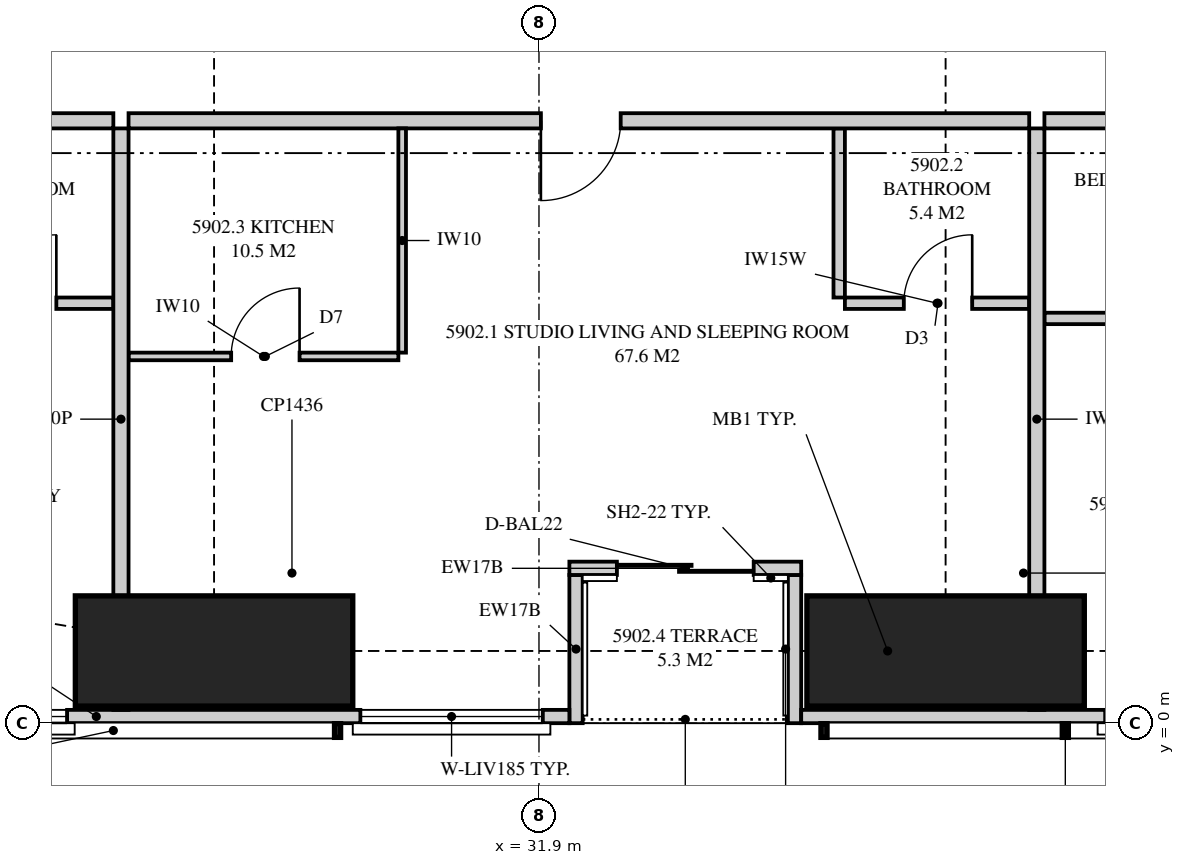
"""IFC4 building model, lengths in metres.
Left out: names, types, materials, properties, quantities, classifications, styles, units other than length and angle.
Written with IfcOpenShell. Run it as: python <this file> out.ifc"""

import sys

from ifc_helpers import new_model, si_unit, direction, frame, frame_2d, origin, origin_2d, place, context, subcontext, project, spatial, polyline, rectangle, outline, extrude, element, fill, save


model = new_model("IFC4")
c1 = context("Model", 3, precision=1e-05, world=origin(), true_north=direction((0.0, 1.0)))
c2 = subcontext(c1, "Body", "Model", "MODEL_VIEW")
j1 = project(units=[si_unit("LENGTHUNIT", "METRE"), si_unit("PLANEANGLEUNIT", "RADIAN")], contexts=[c1])
p1 = place(None, origin())
s1 = spatial("IfcSite", under=j1, at=p1, CompositionType="ELEMENT")
p2 = place(p1, origin())
s2 = spatial("IfcBuilding", under=s1, at=p2, CompositionType="ELEMENT")
p3 = place(p2, frame((0.0, 0.0, 217.95)))
s3 = spatial("IfcBuildingStorey", under=s2, at=p3, CompositionType="ELEMENT", Elevation=217.95)
for number, where, z_axis, x_axis in (
    (1, (27.625, 0.95, 0.0), (0.0, 0.0, 1.0), (0.0, 1.0, 0.0)),
    (2, (37.25, 0.95, 0.0), (0.0, 0.0, 1.0), (0.0, 1.0, 0.0)),
):
    element("IfcColumn", number, at=place(p3, frame(where, z_axis=z_axis, x_axis=x_axis)), inside=s3, PredefinedType="COLUMN", context=c2, shape_type="SweptSolid", body=[
        extrude(rectangle(XDim=1.45, YDim=3.65, at=origin_2d()), origin(), (0.0, 0.0, 1.0), 3.5),
    ])
p4 = place(p3, frame((19.851, 0.087, 0.0), z_axis=(0.0, 0.0, 1.0), x_axis=(1.0, 0.0, 0.0)))
e3 = element("IfcWall", 3, at=p4, inside=s3, PredefinedType="SOLIDWALL", context=c2, shape_type="SweptSolid", body=[
    extrude(outline(polyline([(0.0, 0.0), (12.449, 0.0), (12.449, 2.3), (7.774, 2.3), (7.774, 3.26), (7.642, 3.26), (7.642, 2.3), (7.559, 2.3), (7.559, 3.26), (0.0, 3.26), (0.0, 0.0)])), frame((0.0, 0.087, 0.0), z_axis=(0.0, -1.0, 0.0), x_axis=(1.0, 0.0, 0.0)), (0.0, 0.0, 1.0), 0.175),
])
p5 = place(p4, frame((0.5, 0.0, 0.4)))
e4 = element("IfcOpeningElement", 4, at=p5, cuts=e3, PredefinedType="OPENING", context=c2, shape_type="SweptSolid", body=[
    extrude(rectangle(XDim=2.4, YDim=1.85, at=frame_2d((1.2, 0.925))), frame((0.0, 0.097, 0.0), z_axis=(0.0, -1.0, 0.0), x_axis=(1.0, 0.0, 0.0)), (0.0, 0.0, 1.0), 0.195),
])
p6 = place(p4, frame((4.04, 0.0, 0.4)))
e5 = element("IfcOpeningElement", 5, at=p6, cuts=e3, PredefinedType="OPENING", context=c2, shape_type="SweptSolid", body=[
    extrude(rectangle(XDim=1.8, YDim=1.85, at=frame_2d((0.9, 0.925))), frame((0.0, 0.097, 0.0), z_axis=(0.0, -1.0, 0.0), x_axis=(1.0, 0.0, 0.0)), (0.0, 0.0, 1.0), 0.195),
])
p7 = place(p4, frame((9.699, 0.0, 0.4)))
e6 = element("IfcOpeningElement", 6, at=p7, cuts=e3, PredefinedType="OPENING", context=c2, shape_type="SweptSolid", body=[
    extrude(rectangle(XDim=2.4, YDim=1.85, at=frame_2d((1.2, 0.925))), frame((0.0, 0.097, 0.0), z_axis=(0.0, -1.0, 0.0), x_axis=(1.0, 0.0, 0.0)), (0.0, 0.0, 1.0), 0.195),
])
p8 = place(p3, frame((35.35, 0.087, 0.0), z_axis=(0.0, 0.0, 1.0), x_axis=(1.0, 0.0, 0.0)))
e7 = element("IfcWall", 7, at=p8, inside=s3, PredefinedType="SOLIDWALL", context=c2, shape_type="SweptSolid", body=[
    extrude(outline(polyline([(0.0, 0.0), (18.099, 0.0), (18.099, 3.26), (11.74, 3.26), (11.74, 2.3), (11.656, 2.3), (11.656, 3.26), (11.525, 3.26), (11.525, 2.3), (0.0, 2.3), (0.0, 0.0)])), frame((0.0, 0.087, 0.0), z_axis=(0.0, -1.0, 0.0), x_axis=(1.0, 0.0, 0.0)), (0.0, 0.0, 1.0), 0.175),
])
p9 = place(p8, frame((4.0, 0.0, 0.4)))
e8 = element("IfcOpeningElement", 8, at=p9, cuts=e7, PredefinedType="OPENING", context=c2, shape_type="SweptSolid", body=[
    extrude(rectangle(XDim=1.8, YDim=1.85, at=frame_2d((0.9, 0.925))), frame((0.0, 0.097, 0.0), z_axis=(0.0, -1.0, 0.0), x_axis=(1.0, 0.0, 0.0)), (0.0, 0.0, 1.0), 0.195),
])
p10 = place(p8, frame((7.6, 0.0, 0.4)))
e9 = element("IfcOpeningElement", 9, at=p10, cuts=e7, PredefinedType="OPENING", context=c2, shape_type="SweptSolid", body=[
    extrude(rectangle(XDim=1.8, YDim=1.85, at=frame_2d((0.9, 0.925))), frame((0.0, 0.097, 0.0), z_axis=(0.0, -1.0, 0.0), x_axis=(1.0, 0.0, 0.0)), (0.0, 0.0, 1.0), 0.195),
])
p11 = place(p8, frame((13.51, 0.0, 0.4)))
e10 = element("IfcOpeningElement", 10, at=p11, cuts=e7, PredefinedType="OPENING", context=c2, shape_type="SweptSolid", body=[
    extrude(rectangle(XDim=2.4, YDim=1.85, at=frame_2d((1.2, 0.925))), frame((0.0, 0.097, 0.0), z_axis=(0.0, -1.0, 0.0), x_axis=(1.0, 0.0, 0.0)), (0.0, 0.0, 1.0), 0.195),
])
p12 = place(p3, frame((32.3, 2.038, 0.0), z_axis=(0.0, 0.0, 1.0), x_axis=(1.0, 0.0, 0.0)))
e11 = element("IfcWall", 11, at=p12, inside=s3, PredefinedType="SOLIDWALL", context=c2, shape_type="SweptSolid", body=[
    extrude(rectangle(XDim=3.05, YDim=0.175, at=frame_2d((1.525, 0.0))), origin(), (0.0, 0.0, 1.0), 3.26),
])
p13 = place(p12, frame((0.625, 0.0, 0.0)))
e12 = element("IfcOpeningElement", 12, at=p13, cuts=e11, PredefinedType="OPENING", context=c2, shape_type="SweptSolid", body=[
    extrude(rectangle(XDim=1.8, YDim=2.25, at=frame_2d((0.9, 1.125))), frame((0.0, 0.097, 0.0), z_axis=(0.0, -1.0, 0.0), x_axis=(1.0, 0.0, 0.0)), (0.0, 0.0, 1.0), 0.195),
])
for number, where, z_axis, x_axis in (
    (13, (32.387, 0.0, 0.0), (0.0, 0.0, 1.0), (0.0, 1.0, 0.0)),
    (14, (35.262, 0.0, 0.0), (0.0, 0.0, 1.0), (0.0, 1.0, 0.0)),
):
    element("IfcWall", number, at=place(p3, frame(where, z_axis=z_axis, x_axis=x_axis)), inside=s3, PredefinedType="SOLIDWALL", context=c2, shape_type="SweptSolid", body=[
        extrude(outline(polyline([(0.0, 0.0), (1.95, 0.0), (1.95, 3.26), (1.75, 3.26), (1.75, 2.3), (0.15, 2.3), (0.15, 3.26), (0.0, 3.26), (0.0, 0.0)])), frame((0.0, 0.087, 0.0), z_axis=(0.0, -1.0, 0.0), x_axis=(1.0, 0.0, 0.0)), (0.0, 0.0, 1.0), 0.175),
    ])
p14 = place(p3, frame((26.4, 0.175, 0.0), z_axis=(0.0, 0.0, 1.0), x_axis=(0.0, 1.0, 0.0)))
e15 = element("IfcWall", 15, at=p14, inside=s3, PredefinedType="PARTITIONING", context=c2, shape_type="SweptSolid", body=[
    extrude(outline(polyline([(0.06, 3.26), (0.0, 3.26), (0.0, 0.0), (0.529, 0.0), (0.529, 0.19), (1.021, 0.19), (1.021, 0.0), (7.65, 0.0), (7.65, 2.66), (1.906, 2.66), (1.906, 2.3), (1.021, 2.3), (1.021, 1.96), (0.529, 1.96), (0.529, 2.3), (0.06, 2.3), (0.06, 3.26)])), frame((0.0, 0.1, 0.0), z_axis=(0.0, -1.0, 0.0), x_axis=(1.0, 0.0, 0.0)), (0.0, 0.0, 1.0), 0.2),
])
p15 = place(p3, frame((18.0, 7.925, 0.0), z_axis=(0.0, 0.0, 1.0), x_axis=(1.0, 0.0, 0.0)))
e16 = element("IfcWall", 16, at=p15, inside=s3, PredefinedType="PARTITIONING", context=c2, shape_type="SweptSolid", body=[
    extrude(outline(polyline([(0.0, 0.0), (8.3, 0.0), (8.3, 3.26), (1.839, 3.26), (1.839, 2.3), (0.0, 2.3), (0.0, 3.26), (0.0, 0.0)])), frame((0.0, 0.1, 0.0), z_axis=(0.0, -1.0, 0.0), x_axis=(1.0, 0.0, 0.0)), (0.0, 0.0, 1.0), 0.2),
])
p16 = place(p15, frame((3.7, 0.0, 0.0)))
e17 = element("IfcOpeningElement", 17, at=p16, cuts=e16, PredefinedType="OPENING", context=c2, shape_type="SweptSolid", body=[
    extrude(rectangle(XDim=1.05, YDim=2.2, at=frame_2d((0.525, 1.1))), frame((0.0, 0.11, 0.0), z_axis=(0.0, -1.0, 0.0), x_axis=(1.0, 0.0, 0.0)), (0.0, 0.0, 1.0), 0.22),
])
p17 = place(p3, frame((23.875, 5.525, 0.0), z_axis=(0.0, 0.0, 1.0), x_axis=(1.0, 0.0, 0.0)))
e18 = element("IfcWall", 18, at=p17, inside=s3, PredefinedType="PLUMBINGWALL", context=c2, shape_type="SweptSolid", body=[
    extrude(rectangle(XDim=2.425, YDim=0.15, at=frame_2d((1.212, 0.0))), origin(), (0.0, 0.0, 1.0), 3.26),
])
p18 = place(p17, frame((0.775, 0.0, 0.0)))
e19 = element("IfcOpeningElement", 19, at=p18, cuts=e18, PredefinedType="OPENING", context=c2, shape_type="SweptSolid", body=[
    extrude(rectangle(XDim=0.9, YDim=2.1, at=frame_2d((0.45, 1.05))), frame((0.0, 0.085, 0.0), z_axis=(0.0, -1.0, 0.0), x_axis=(1.0, 0.0, 0.0)), (0.0, 0.0, 1.0), 0.17),
])
p19 = place(p3, frame((38.45, 0.175, 0.0), z_axis=(0.0, 0.0, 1.0), x_axis=(0.0, 1.0, 0.0)))
e20 = element("IfcWall", 20, at=p19, inside=s3, PredefinedType="PARTITIONING", context=c2, shape_type="SweptSolid", body=[
    extrude(outline(polyline([(0.529, 2.3), (0.0, 2.3), (0.0, 0.0), (0.529, 0.0), (0.529, 0.22), (1.021, 0.22), (1.021, 0.0), (7.65, 0.0), (7.65, 2.66), (1.685, 2.66), (1.685, 2.3), (1.021, 2.3), (1.021, 1.93), (0.529, 1.93), (0.529, 2.3)])), frame((0.0, 0.1, 0.0), z_axis=(0.0, -1.0, 0.0), x_axis=(1.0, 0.0, 0.0)), (0.0, 0.0, 1.0), 0.2),
])
p20 = place(p3, frame((26.5, 7.925, 0.0), z_axis=(0.0, 0.0, 1.0), x_axis=(1.0, 0.0, 0.0)))
e21 = element("IfcWall", 21, at=p20, inside=s3, PredefinedType="PARTITIONING", context=c2, shape_type="SweptSolid", body=[
    extrude(outline(polyline([(0.0, 0.0), (11.85, 0.0), (11.85, 3.26), (11.85, 2.66), (9.44, 2.66), (9.44, 3.26), (2.435, 3.26), (2.435, 2.66), (0.0, 2.66), (0.0, 3.26), (0.0, 0.0)])), frame((0.0, 0.1, 0.0), z_axis=(0.0, -1.0, 0.0), x_axis=(1.0, 0.0, 0.0)), (0.0, 0.0, 1.0), 0.2),
])
p21 = place(p20, frame((5.425, 0.0, 0.0)))
e22 = element("IfcOpeningElement", 22, at=p21, cuts=e21, PredefinedType="OPENING", context=c2, shape_type="SweptSolid", body=[
    extrude(rectangle(XDim=1.05, YDim=2.2, at=frame_2d((0.525, 1.1))), frame((0.0, 0.11, 0.0), z_axis=(0.0, -1.0, 0.0), x_axis=(1.0, 0.0, 0.0)), (0.0, 0.0, 1.0), 0.22),
])
p22 = place(p3, frame((35.925, 5.525, 0.0), z_axis=(0.0, 0.0, 1.0), x_axis=(1.0, 0.0, 0.0)))
e23 = element("IfcWall", 23, at=p22, inside=s3, PredefinedType="PLUMBINGWALL", context=c2, shape_type="SweptSolid", body=[
    extrude(outline(polyline([(0.0, 0.0), (2.425, 0.0), (2.425, 3.26), (2.425, 2.66), (0.04, 2.66), (0.04, 3.26), (0.0, 3.26), (0.0, 0.0)])), frame((0.0, 0.075, 0.0), z_axis=(0.0, -1.0, 0.0), x_axis=(1.0, 0.0, 0.0)), (0.0, 0.0, 1.0), 0.15),
])
p23 = place(p22, frame((0.775, 0.0, 0.0)))
e24 = element("IfcOpeningElement", 24, at=p23, cuts=e23, PredefinedType="OPENING", context=c2, shape_type="SweptSolid", body=[
    extrude(rectangle(XDim=0.9, YDim=2.1, at=frame_2d((0.45, 1.05))), frame((0.0, 0.085, 0.0), z_axis=(0.0, -1.0, 0.0), x_axis=(1.0, 0.0, 0.0)), (0.0, 0.0, 1.0), 0.17),
])
p24 = place(p3, frame((35.85, 5.6, 0.0), z_axis=(0.0, 0.0, 1.0), x_axis=(0.0, 1.0, 0.0)))
e25 = element("IfcWall", 25, at=p24, inside=s3, PredefinedType="PLUMBINGWALL", context=c2, shape_type="SweptSolid", body=[
    extrude(rectangle(XDim=2.225, YDim=0.15, at=frame_2d((1.112, 0.0))), origin(), (0.0, 0.0, 1.0), 3.26),
])
p25 = place(p3, frame((26.5, 4.825, 0.0), z_axis=(0.0, 0.0, 1.0), x_axis=(1.0, 0.0, 0.0)))
e26 = element("IfcWall", 26, at=p25, inside=s3, PredefinedType="PARTITIONING", context=c2, shape_type="SweptSolid", body=[
    extrude(outline(polyline([(0.0, 0.0), (3.55, 0.0), (3.55, 3.26), (2.385, 3.26), (2.385, 2.66), (0.0, 2.66), (0.0, 3.26), (0.0, 0.0)])), frame((0.0, 0.05, 0.0), z_axis=(0.0, -1.0, 0.0), x_axis=(1.0, 0.0, 0.0)), (0.0, 0.0, 1.0), 0.1),
])
p26 = place(p25, frame((1.35, 0.0, 0.0)))
e27 = element("IfcOpeningElement", 27, at=p26, cuts=e26, PredefinedType="OPENING", context=c2, shape_type="SweptSolid", body=[
    extrude(rectangle(XDim=0.9, YDim=2.1, at=frame_2d((0.45, 1.05))), frame((0.0, 0.06, 0.0), z_axis=(0.0, -1.0, 0.0), x_axis=(1.0, 0.0, 0.0)), (0.0, 0.0, 1.0), 0.12),
])
p27 = place(p3, frame((30.1, 4.875, 0.0), z_axis=(0.0, 0.0, 1.0), x_axis=(0.0, 1.0, 0.0)))
e28 = element("IfcWall", 28, at=p27, inside=s3, PredefinedType="PARTITIONING", context=c2, shape_type="SweptSolid", body=[
    extrude(rectangle(XDim=2.95, YDim=0.1, at=frame_2d((1.475, 0.0))), origin(), (0.0, 0.0, 1.0), 3.26),
])
p28 = place(p3, frame((38.55, 7.925, 0.0), z_axis=(0.0, 0.0, 1.0), x_axis=(1.0, 0.0, 0.0)))
e29 = element("IfcWall", 29, at=p28, inside=s3, PredefinedType="PARTITIONING", context=c2, shape_type="SweptSolid", body=[
    extrude(outline(polyline([(0.0, 0.0), (7.325, 0.0), (7.325, 3.26), (7.325, 2.66), (7.015, 2.66), (7.015, 3.26), (0.01, 3.26), (0.01, 2.66), (0.0, 2.66), (0.0, 3.26), (0.0, 0.0)])), frame((0.0, 0.1, 0.0), z_axis=(0.0, -1.0, 0.0), x_axis=(1.0, 0.0, 0.0)), (0.0, 0.0, 1.0), 0.2),
])
p29 = place(p28, frame((6.125, 0.0, 0.0)))
e30 = element("IfcOpeningElement", 30, at=p29, cuts=e29, PredefinedType="OPENING", context=c2, shape_type="SweptSolid", body=[
    extrude(rectangle(XDim=1.05, YDim=2.2, at=frame_2d((0.525, 1.1))), frame((0.0, 0.11, 0.0), z_axis=(0.0, -1.0, 0.0), x_axis=(1.0, 0.0, 0.0)), (0.0, 0.0, 1.0), 0.22),
])
p30 = place(p3, frame((38.55, 5.325, 0.0), z_axis=(0.0, 0.0, 1.0), x_axis=(1.0, 0.0, 0.0)))
e31 = element("IfcWall", 31, at=p30, inside=s3, PredefinedType="PLUMBINGWALL", context=c2, shape_type="SweptSolid", body=[
    extrude(rectangle(XDim=3.45, YDim=0.15, at=frame_2d((1.725, 0.0))), origin(), (0.0, 0.0, 1.0), 3.26),
])
p31 = place(p30, frame((2.15, 0.0, 0.0)))
e32 = element("IfcOpeningElement", 32, at=p31, cuts=e31, PredefinedType="OPENING", context=c2, shape_type="SweptSolid", body=[
    extrude(rectangle(XDim=0.9, YDim=2.1, at=frame_2d((0.45, 1.05))), frame((0.0, 0.085, 0.0), z_axis=(0.0, -1.0, 0.0), x_axis=(1.0, 0.0, 0.0)), (0.0, 0.0, 1.0), 0.17),
])
p32 = place(p6, origin())
e33 = element("IfcWindow", 33, at=p32, inside=s3, PartitioningType="SINGLE_PANEL", PredefinedType="WINDOW", context=c2, shape_type="SweptSolid", body=[
    extrude(rectangle(XDim=1.8, YDim=1.85, at=frame_2d((0.9, 0.925))), frame((0.0, 0.03, 0.0), z_axis=(0.0, -1.0, 0.0), x_axis=(1.0, 0.0, 0.0)), (0.0, 0.0, 1.0), 0.06),
])
fill(e5, e33)
p33 = place(p13, origin())
e34 = element("IfcDoor", 34, at=p33, inside=s3, OperationType="SLIDING_TO_LEFT", PredefinedType="DOOR", context=c2, shape_type="SweptSolid", body=[
    extrude(rectangle(XDim=1.8, YDim=2.25, at=frame_2d((0.9, 1.125))), frame((0.0, 0.025, 0.0), z_axis=(0.0, -1.0, 0.0), x_axis=(1.0, 0.0, 0.0)), (0.0, 0.0, 1.0), 0.05),
])
fill(e12, e34)
p34 = place(p7, origin())
e35 = element("IfcWindow", 35, at=p34, inside=s3, PartitioningType="SINGLE_PANEL", PredefinedType="WINDOW", context=c2, shape_type="SweptSolid", body=[
    extrude(rectangle(XDim=2.4, YDim=1.85, at=frame_2d((1.2, 0.925))), frame((0.0, 0.03, 0.0), z_axis=(0.0, -1.0, 0.0), x_axis=(1.0, 0.0, 0.0)), (0.0, 0.0, 1.0), 0.06),
])
fill(e6, e35)
p35 = place(p9, origin())
e36 = element("IfcWindow", 36, at=p35, inside=s3, PartitioningType="SINGLE_PANEL", PredefinedType="WINDOW", context=c2, shape_type="SweptSolid", body=[
    extrude(rectangle(XDim=1.8, YDim=1.85, at=frame_2d((0.9, 0.925))), frame((0.0, 0.03, 0.0), z_axis=(0.0, -1.0, 0.0), x_axis=(1.0, 0.0, 0.0)), (0.0, 0.0, 1.0), 0.06),
])
fill(e8, e36)
p36 = place(p18, origin())
e37 = element("IfcDoor", 37, at=p36, inside=s3, OperationType="SINGLE_SWING_RIGHT", PredefinedType="DOOR", context=c2, shape_type="SweptSolid", body=[
    extrude(rectangle(XDim=0.9, YDim=2.1, at=frame_2d((0.45, 1.05))), frame((0.0, 0.025, 0.0), z_axis=(0.0, -1.0, 0.0), x_axis=(1.0, 0.0, 0.0)), (0.0, 0.0, 1.0), 0.05),
])
fill(e19, e37)
p37 = place(p21, frame((1.05, 0.0, 0.0), z_axis=(0.0, 0.0, 1.0), x_axis=(-1.0, 0.0, 0.0)))
e38 = element("IfcDoor", 38, at=p37, inside=s3, OperationType="SINGLE_SWING_RIGHT", PredefinedType="DOOR", context=c2, shape_type="SweptSolid", body=[
    extrude(rectangle(XDim=1.05, YDim=2.2, at=frame_2d((0.525, 1.1))), frame((0.0, 0.025, 0.0), z_axis=(0.0, -1.0, 0.0), x_axis=(1.0, 0.0, 0.0)), (0.0, 0.0, 1.0), 0.05),
])
fill(e22, e38)
p38 = place(p23, origin())
e39 = element("IfcDoor", 39, at=p38, inside=s3, OperationType="SINGLE_SWING_RIGHT", PredefinedType="DOOR", context=c2, shape_type="SweptSolid", body=[
    extrude(rectangle(XDim=0.9, YDim=2.1, at=frame_2d((0.45, 1.05))), frame((0.0, 0.025, 0.0), z_axis=(0.0, -1.0, 0.0), x_axis=(1.0, 0.0, 0.0)), (0.0, 0.0, 1.0), 0.05),
])
fill(e24, e39)
p39 = place(p26, origin())
e40 = element("IfcDoor", 40, at=p39, inside=s3, OperationType="SINGLE_SWING_RIGHT", PredefinedType="DOOR", context=c2, shape_type="SweptSolid", body=[
    extrude(rectangle(XDim=0.9, YDim=2.1, at=frame_2d((0.45, 1.05))), frame((0.0, 0.025, 0.0), z_axis=(0.0, -1.0, 0.0), x_axis=(1.0, 0.0, 0.0)), (0.0, 0.0, 1.0), 0.05),
])
fill(e27, e40)
save(model, sys.argv[1])
